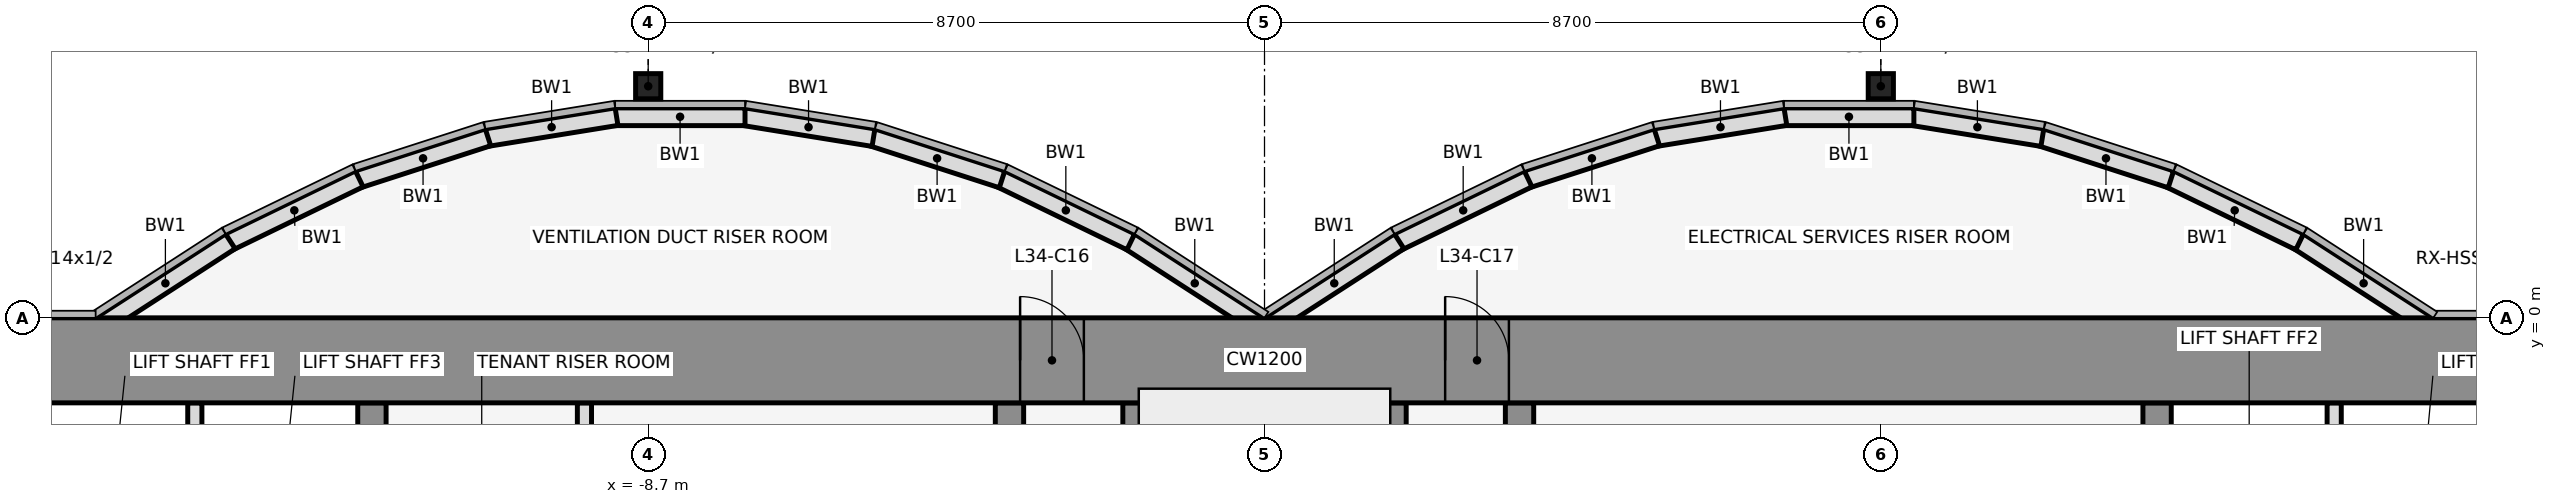
"""IFC4 building model, lengths in metres.
Left out: names, types, materials, properties, quantities, classifications, styles, units other than length and angle.
Written with IfcOpenShell. Run it as: python <this file> out.ifc"""

import sys

from ifc_helpers import new_model, si_unit, direction, frame, frame_2d, origin, origin_2d, place, context, subcontext, project, spatial, rectangle, hollow_rectangle, extrude, element, fill, save


model = new_model("IFC4")
c1 = context("Model", 3, precision=1e-05, world=origin(), true_north=direction((0.0, 1.0)))
c2 = subcontext(c1, "Body", "Model", "MODEL_VIEW")
j1 = project(units=[si_unit("LENGTHUNIT", "METRE"), si_unit("PLANEANGLEUNIT", "RADIAN")], contexts=[c1])
p1 = place(None, origin())
s1 = spatial("IfcSite", under=j1, at=p1, CompositionType="ELEMENT")
p2 = place(p1, origin())
s2 = spatial("IfcBuilding", under=s1, at=p2, CompositionType="ELEMENT")
p3 = place(p2, frame((0.0, 0.0, 156.8)))
s3 = spatial("IfcBuildingStorey", under=s2, at=p3, CompositionType="ELEMENT", Elevation=156.8)
for number, where, z_axis, x_axis in (
    (1, (-8.7, 3.269, 0.0), (0.0, 0.0, 1.0), (1.0, 0.0, 0.0)),
    (2, (8.7, 3.269, 0.0), (0.0, 0.0, 1.0), (1.0, 0.0, 0.0)),
):
    element("IfcColumn", number, at=place(p3, frame(where, z_axis=z_axis, x_axis=x_axis)), inside=s3, PredefinedType="COLUMN", context=c2, shape_type="SweptSolid", body=[
        extrude(hollow_rectangle(XDim=0.356, YDim=0.356, WallThickness=0.012, at=origin_2d()), origin(), (0.0, 0.0, 1.0), 4.1),
    ])
p4 = place(p3, frame((16.432, -0.105, 0.0), z_axis=(0.0, 0.0, 1.0), x_axis=(-0.83981312244, 0.542875602121, 0.0)))
e3 = element("IfcWall", 3, at=p4, inside=s3, PredefinedType="STANDARD", context=c2, shape_type="SweptSolid", body=[
    extrude(rectangle(XDim=2.183, YDim=0.25, at=frame_2d((1.091, 0.0))), origin(), (0.0, 0.0, 1.0), 3.95),
])
p5 = place(p3, frame((14.612, 1.073, 0.0), z_axis=(0.0, 0.0, 1.0), x_axis=(-0.89982408427, 0.436252928206, 0.0)))
e4 = element("IfcWall", 4, at=p5, inside=s3, PredefinedType="STANDARD", context=c2, shape_type="SweptSolid", body=[
    extrude(rectangle(XDim=2.038, YDim=0.25, at=frame_2d((1.019, 0.0))), origin(), (0.0, 0.0, 1.0), 3.95),
])
p6 = place(p3, frame((12.795, 1.955, 0.0), z_axis=(0.0, 0.0, 1.0), x_axis=(-0.951495806175, 0.307661714928, 0.0)))
e5 = element("IfcWall", 5, at=p6, inside=s3, PredefinedType="STANDARD", context=c2, shape_type="SweptSolid", body=[
    extrude(rectangle(XDim=1.927, YDim=0.25, at=frame_2d((0.963, 0.0))), origin(), (0.0, 0.0, 1.0), 3.95),
])
p7 = place(p3, frame((10.98, 2.543, 0.0), z_axis=(0.0, 0.0, 1.0), x_axis=(-0.987181718931, 0.159600293885, 0.0)))
e6 = element("IfcWall", 6, at=p7, inside=s3, PredefinedType="STANDARD", context=c2, shape_type="SweptSolid", body=[
    extrude(rectangle(XDim=1.857, YDim=0.25, at=frame_2d((0.929, 0.0))), origin(), (0.0, 0.0, 1.0), 3.95),
])
p8 = place(p3, frame((9.167, 2.838, 0.0), z_axis=(0.0, 0.0, 1.0), x_axis=(-1.0, 0.0, 0.0)))
e7 = element("IfcWall", 7, at=p8, inside=s3, PredefinedType="STANDARD", context=c2, shape_type="SweptSolid", body=[
    extrude(rectangle(XDim=1.833, YDim=0.25, at=frame_2d((0.917, 0.0))), origin(), (0.0, 0.0, 1.0), 3.95),
])
p9 = place(p3, frame((7.353, 2.84, 0.0), z_axis=(0.0, 0.0, 1.0), x_axis=(-0.987181718931, -0.159600293885, 0.0)))
e8 = element("IfcWall", 8, at=p9, inside=s3, PredefinedType="STANDARD", context=c2, shape_type="SweptSolid", body=[
    extrude(rectangle(XDim=1.857, YDim=0.25, at=frame_2d((0.929, 0.0))), origin(), (0.0, 0.0, 1.0), 3.95),
])
p10 = place(p3, frame((5.538, 2.548, 0.0), z_axis=(0.0, 0.0, 1.0), x_axis=(-0.951495806175, -0.307661714928, 0.0)))
e9 = element("IfcWall", 9, at=p10, inside=s3, PredefinedType="STANDARD", context=c2, shape_type="SweptSolid", body=[
    extrude(rectangle(XDim=1.927, YDim=0.25, at=frame_2d((0.963, 0.0))), origin(), (0.0, 0.0, 1.0), 3.95),
])
p11 = place(p3, frame((3.721, 1.962, 0.0), z_axis=(0.0, 0.0, 1.0), x_axis=(-0.89982408427, -0.436252928206, 0.0)))
e10 = element("IfcWall", 10, at=p11, inside=s3, PredefinedType="STANDARD", context=c2, shape_type="SweptSolid", body=[
    extrude(rectangle(XDim=2.038, YDim=0.25, at=frame_2d((1.019, 0.0))), origin(), (0.0, 0.0, 1.0), 3.95),
])
for number, where, z_axis, x_axis in (
    (11, (1.901, 1.08, 0.0), (0.0, 0.0, 1.0), (-0.84, -0.543, 0.0)),
    (12, (-0.068, -0.105, 0.0), (0.0, 0.0, 1.0), (-0.84, 0.543, 0.0)),
):
    element("IfcWall", number, at=place(p3, frame(where, z_axis=z_axis, x_axis=x_axis)), inside=s3, PredefinedType="STANDARD", context=c2, shape_type="SweptSolid", body=[
        extrude(rectangle(XDim=2.183, YDim=0.25, at=frame_2d((1.091, 0.0))), origin(), (0.0, 0.0, 1.0), 3.95),
    ])
p12 = place(p3, frame((-1.888, 1.073, 0.0), z_axis=(0.0, 0.0, 1.0), x_axis=(-0.89982408427, 0.436252928206, 0.0)))
e13 = element("IfcWall", 13, at=p12, inside=s3, PredefinedType="STANDARD", context=c2, shape_type="SweptSolid", body=[
    extrude(rectangle(XDim=2.038, YDim=0.25, at=frame_2d((1.019, 0.0))), origin(), (0.0, 0.0, 1.0), 3.95),
])
p13 = place(p3, frame((-3.705, 1.955, 0.0), z_axis=(0.0, 0.0, 1.0), x_axis=(-0.951495806175, 0.307661714928, 0.0)))
e14 = element("IfcWall", 14, at=p13, inside=s3, PredefinedType="STANDARD", context=c2, shape_type="SweptSolid", body=[
    extrude(rectangle(XDim=1.927, YDim=0.25, at=frame_2d((0.963, 0.0))), origin(), (0.0, 0.0, 1.0), 3.95),
])
p14 = place(p3, frame((-5.52, 2.543, 0.0), z_axis=(0.0, 0.0, 1.0), x_axis=(-0.987181718931, 0.159600293885, 0.0)))
e15 = element("IfcWall", 15, at=p14, inside=s3, PredefinedType="STANDARD", context=c2, shape_type="SweptSolid", body=[
    extrude(rectangle(XDim=1.857, YDim=0.25, at=frame_2d((0.929, 0.0))), origin(), (0.0, 0.0, 1.0), 3.95),
])
p15 = place(p3, frame((-7.333, 2.838, 0.0), z_axis=(0.0, 0.0, 1.0), x_axis=(-1.0, 0.0, 0.0)))
e16 = element("IfcWall", 16, at=p15, inside=s3, PredefinedType="STANDARD", context=c2, shape_type="SweptSolid", body=[
    extrude(rectangle(XDim=1.833, YDim=0.25, at=frame_2d((0.917, 0.0))), origin(), (0.0, 0.0, 1.0), 3.95),
])
p16 = place(p3, frame((-9.147, 2.84, 0.0), z_axis=(0.0, 0.0, 1.0), x_axis=(-0.987181718931, -0.159600293885, 0.0)))
e17 = element("IfcWall", 17, at=p16, inside=s3, PredefinedType="STANDARD", context=c2, shape_type="SweptSolid", body=[
    extrude(rectangle(XDim=1.857, YDim=0.25, at=frame_2d((0.929, 0.0))), origin(), (0.0, 0.0, 1.0), 3.95),
])
p17 = place(p3, frame((-10.962, 2.548, 0.0), z_axis=(0.0, 0.0, 1.0), x_axis=(-0.951495806175, -0.307661714928, 0.0)))
e18 = element("IfcWall", 18, at=p17, inside=s3, PredefinedType="STANDARD", context=c2, shape_type="SweptSolid", body=[
    extrude(rectangle(XDim=1.927, YDim=0.25, at=frame_2d((0.963, 0.0))), origin(), (0.0, 0.0, 1.0), 3.95),
])
p18 = place(p3, frame((-12.779, 1.962, 0.0), z_axis=(0.0, 0.0, 1.0), x_axis=(-0.89982408427, -0.436252928206, 0.0)))
e19 = element("IfcWall", 19, at=p18, inside=s3, PredefinedType="STANDARD", context=c2, shape_type="SweptSolid", body=[
    extrude(rectangle(XDim=2.038, YDim=0.25, at=frame_2d((1.019, 0.0))), origin(), (0.0, 0.0, 1.0), 3.95),
])
p19 = place(p3, frame((-14.599, 1.08, 0.0), z_axis=(0.0, 0.0, 1.0), x_axis=(-0.83981312244, -0.542875602121, 0.0)))
e20 = element("IfcWall", 20, at=p19, inside=s3, PredefinedType="STANDARD", context=c2, shape_type="SweptSolid", body=[
    extrude(rectangle(XDim=2.183, YDim=0.25, at=frame_2d((1.091, 0.0))), origin(), (0.0, 0.0, 1.0), 3.95),
])
p20 = place(p3, frame((-15.1, -4.6, 0.0), z_axis=(0.0, 0.0, 1.0), x_axis=(0.0, 1.0, 0.0)))
e21 = element("IfcWall", 21, at=p20, inside=s3, PredefinedType="PARTITIONING", context=c2, shape_type="SweptSolid", body=[
    extrude(rectangle(XDim=3.4, YDim=0.2, at=frame_2d((1.7, 0.0))), origin(), (0.0, 0.0, 1.0), 2.84),
])
p21 = place(p3, frame((-12.6, -11.8, 0.0), z_axis=(0.0, 0.0, 1.0), x_axis=(0.0, 1.0, 0.0)))
e22 = element("IfcWall", 22, at=p21, inside=s3, PredefinedType="SHEAR", context=c2, shape_type="SweptSolid", body=[
    extrude(rectangle(XDim=10.6, YDim=0.4, at=frame_2d((5.3, 0.0))), origin(), (0.0, 0.0, 1.0), 4.1),
])
p22 = place(p21, frame((4.75, 0.0, 0.0)))
e23 = element("IfcOpeningElement", 23, at=p22, cuts=e22, PredefinedType="OPENING", context=c2, shape_type="SweptSolid", body=[
    extrude(rectangle(XDim=1.1, YDim=2.1, at=frame_2d((0.55, 1.05))), frame((0.0, 0.212, 0.0), z_axis=(0.0, -1.0, 0.0), x_axis=(1.0, 0.0, 0.0)), (0.0, 0.0, 1.0), 0.424),
])
p23 = place(p3, frame((-9.6, -4.6, 0.0), z_axis=(0.0, 0.0, 1.0), x_axis=(0.0, 1.0, 0.0)))
e24 = element("IfcWall", 24, at=p23, inside=s3, PredefinedType="PARTITIONING", context=c2, shape_type="SweptSolid", body=[
    extrude(rectangle(XDim=3.4, YDim=0.2, at=frame_2d((1.7, 0.0))), origin(), (0.0, 0.0, 1.0), 2.84),
])
p24 = place(p3, frame((-3.6, -11.8, 0.0), z_axis=(0.0, 0.0, 1.0), x_axis=(0.0, 1.0, 0.0)))
e25 = element("IfcWall", 25, at=p24, inside=s3, PredefinedType="SHEAR", context=c2, shape_type="SweptSolid", body=[
    extrude(rectangle(XDim=10.6, YDim=0.4, at=frame_2d((5.3, 0.0))), origin(), (0.0, 0.0, 1.0), 4.1),
])
p25 = place(p24, frame((4.85, 0.0, 0.0)))
e26 = element("IfcOpeningElement", 26, at=p25, cuts=e25, PredefinedType="OPENING", context=c2, shape_type="SweptSolid", body=[
    extrude(rectangle(XDim=0.9, YDim=2.1, at=frame_2d((0.45, 1.05))), frame((0.0, 0.212, 0.0), z_axis=(0.0, -1.0, 0.0), x_axis=(1.0, 0.0, 0.0)), (0.0, 0.0, 1.0), 0.424),
])
for number, where, z_axis, x_axis in (
    (27, (-1.8, -11.8, 0.0), (0.0, 0.0, 1.0), (0.0, 1.0, 0.0)),
    (28, (1.8, -11.8, 0.0), (0.0, 0.0, 1.0), (0.0, 1.0, 0.0)),
):
    element("IfcWall", number, at=place(p3, frame(where, z_axis=z_axis, x_axis=x_axis)), inside=s3, PredefinedType="SHEAR", context=c2, shape_type="SweptSolid", body=[
        extrude(rectangle(XDim=10.6, YDim=0.4, at=frame_2d((5.3, 0.0))), origin(), (0.0, 0.0, 1.0), 4.1),
    ])
p26 = place(p3, frame((3.6, -11.8, 0.0), z_axis=(0.0, 0.0, 1.0), x_axis=(0.0, 1.0, 0.0)))
e29 = element("IfcWall", 29, at=p26, inside=s3, PredefinedType="SHEAR", context=c2, shape_type="SweptSolid", body=[
    extrude(rectangle(XDim=10.6, YDim=0.4, at=frame_2d((5.3, 0.0))), origin(), (0.0, 0.0, 1.0), 4.1),
])
p27 = place(p26, frame((1.35, 0.0, 0.0)))
e30 = element("IfcOpeningElement", 30, at=p27, cuts=e29, PredefinedType="OPENING", context=c2, shape_type="SweptSolid", body=[
    extrude(rectangle(XDim=0.9, YDim=2.1, at=frame_2d((0.45, 1.05))), frame((0.0, 0.212, 0.0), z_axis=(0.0, -1.0, 0.0), x_axis=(1.0, 0.0, 0.0)), (0.0, 0.0, 1.0), 0.424),
])
p28 = place(p3, frame((12.6, -11.8, 0.0), z_axis=(0.0, 0.0, 1.0), x_axis=(0.0, 1.0, 0.0)))
e31 = element("IfcWall", 31, at=p28, inside=s3, PredefinedType="SHEAR", context=c2, shape_type="SweptSolid", body=[
    extrude(rectangle(XDim=10.6, YDim=0.4, at=frame_2d((5.3, 0.0))), origin(), (0.0, 0.0, 1.0), 4.1),
])
p29 = place(p28, frame((1.25, 0.0, 0.0)))
e32 = element("IfcOpeningElement", 32, at=p29, cuts=e31, PredefinedType="OPENING", context=c2, shape_type="SweptSolid", body=[
    extrude(rectangle(XDim=1.2, YDim=2.1, at=frame_2d((0.6, 1.05))), frame((0.0, 0.212, 0.0), z_axis=(0.0, -1.0, 0.0), x_axis=(1.0, 0.0, 0.0)), (0.0, 0.0, 1.0), 0.424),
])
p30 = place(p28, frame((4.75, 0.0, 0.0)))
e33 = element("IfcOpeningElement", 33, at=p30, cuts=e31, PredefinedType="OPENING", context=c2, shape_type="SweptSolid", body=[
    extrude(rectangle(XDim=1.1, YDim=2.1, at=frame_2d((0.55, 1.05))), frame((0.0, 0.212, 0.0), z_axis=(0.0, -1.0, 0.0), x_axis=(1.0, 0.0, 0.0)), (0.0, 0.0, 1.0), 0.424),
])
p31 = place(p3, frame((15.1, -4.6, 0.0), z_axis=(0.0, 0.0, 1.0), x_axis=(0.0, 1.0, 0.0)))
e34 = element("IfcWall", 34, at=p31, inside=s3, PredefinedType="PARTITIONING", context=c2, shape_type="SweptSolid", body=[
    extrude(rectangle(XDim=3.4, YDim=0.2, at=frame_2d((1.7, 0.0))), origin(), (0.0, 0.0, 1.0), 2.84),
])
p32 = place(p3, frame((-22.0, -0.6, 0.0), z_axis=(0.0, 0.0, 1.0), x_axis=(1.0, 0.0, 0.0)))
e35 = element("IfcWall", 35, at=p32, inside=s3, PredefinedType="SHEAR", context=c2, shape_type="SweptSolid", body=[
    extrude(rectangle(XDim=44.0, YDim=1.2, at=frame_2d((22.0, 0.0))), origin(), (0.0, 0.0, 1.0), 4.1),
])
p33 = place(p32, frame((18.55, 0.0, 0.0)))
e36 = element("IfcOpeningElement", 36, at=p33, cuts=e35, PredefinedType="OPENING", context=c2, shape_type="SweptSolid", body=[
    extrude(rectangle(XDim=0.9, YDim=2.1, at=frame_2d((0.45, 1.05))), frame((0.0, 0.612, 0.0), z_axis=(0.0, -1.0, 0.0), x_axis=(1.0, 0.0, 0.0)), (0.0, 0.0, 1.0), 1.224),
])
p34 = place(p32, frame((24.55, 0.0, 0.0)))
e37 = element("IfcOpeningElement", 37, at=p34, cuts=e35, PredefinedType="OPENING", context=c2, shape_type="SweptSolid", body=[
    extrude(rectangle(XDim=0.9, YDim=2.1, at=frame_2d((0.45, 1.05))), frame((0.0, 0.612, 0.0), z_axis=(0.0, -1.0, 0.0), x_axis=(1.0, 0.0, 0.0)), (0.0, 0.0, 1.0), 1.224),
])
p35 = place(p33, origin())
e38 = element("IfcDoor", 38, at=p35, inside=s3, OperationType="SINGLE_SWING_LEFT", PredefinedType="DOOR", context=c2, shape_type="SweptSolid", body=[
    extrude(rectangle(XDim=0.9, YDim=2.1, at=frame_2d((0.45, 1.05))), frame((0.0, 0.025, 0.0), z_axis=(0.0, -1.0, 0.0), x_axis=(1.0, 0.0, 0.0)), (0.0, 0.0, 1.0), 0.05),
])
fill(e36, e38)
p36 = place(p34, origin())
e39 = element("IfcDoor", 39, at=p36, inside=s3, OperationType="SINGLE_SWING_LEFT", PredefinedType="DOOR", context=c2, shape_type="SweptSolid", body=[
    extrude(rectangle(XDim=0.9, YDim=2.1, at=frame_2d((0.45, 1.05))), frame((0.0, 0.025, 0.0), z_axis=(0.0, -1.0, 0.0), x_axis=(1.0, 0.0, 0.0)), (0.0, 0.0, 1.0), 0.05),
])
fill(e37, e39)
save(model, sys.argv[1])
